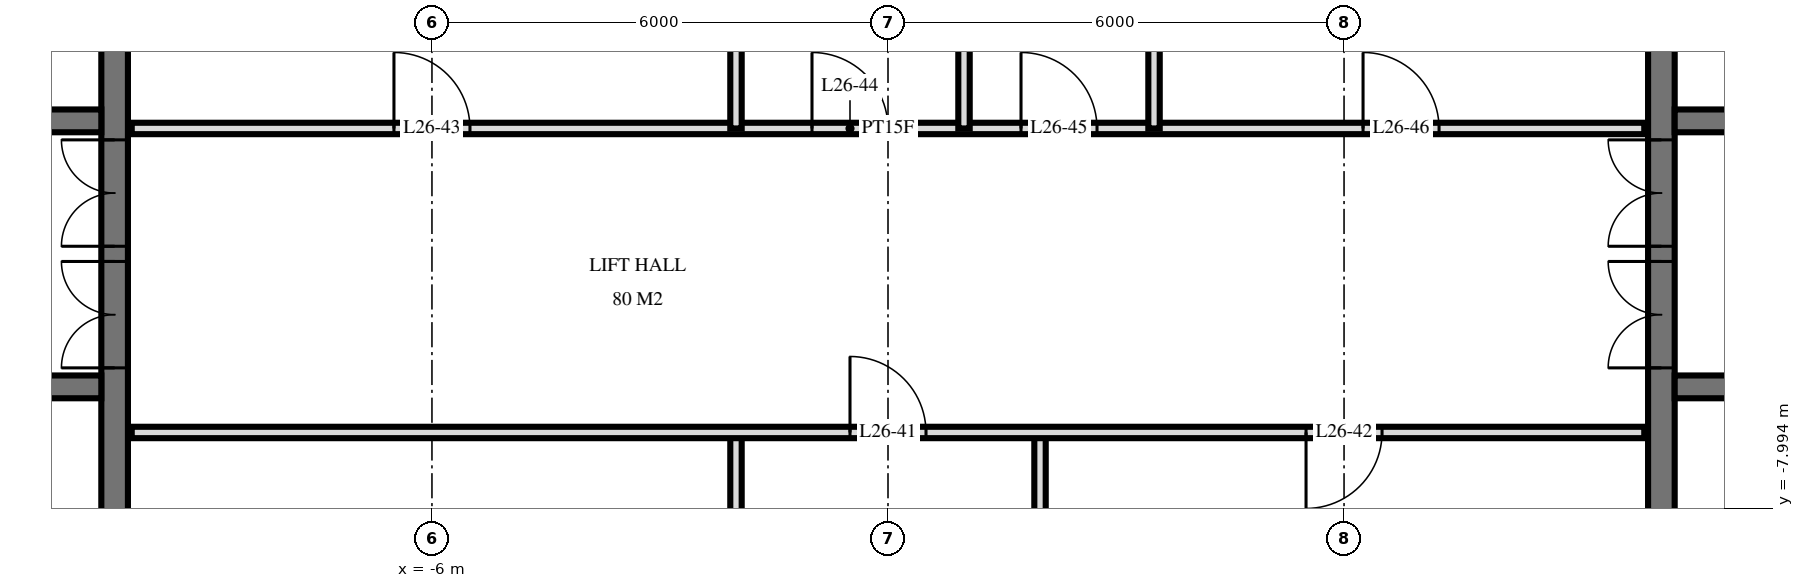
"""IFC4 building model, lengths in metres.
Left out: names, types, materials, properties, quantities, classifications, styles, units other than length and angle.
Written with IfcOpenShell. Run it as: python <this file> out.ifc"""

import sys

from ifc_helpers import new_model, si_unit, direction, frame, frame_2d, origin, place, context, subcontext, project, spatial, rectangle, extrude, element, fill, save


model = new_model("IFC4")
c1 = context("Model", 3, precision=1e-05, world=origin(), true_north=direction((0.0, 1.0)))
c2 = subcontext(c1, "Body", "Model", "MODEL_VIEW")
j1 = project(units=[si_unit("LENGTHUNIT", "METRE"), si_unit("PLANEANGLEUNIT", "RADIAN")], contexts=[c1])
p1 = place(None, origin())
s1 = spatial("IfcSite", under=j1, at=p1, CompositionType="ELEMENT")
p2 = place(p1, origin())
s2 = spatial("IfcBuilding", under=s1, at=p2, CompositionType="ELEMENT")
p3 = place(p2, frame((0.0, 0.0, 103.2)))
s3 = spatial("IfcBuildingStorey", under=s2, at=p3, CompositionType="ELEMENT", Elevation=103.2)
p4 = place(p3, frame((-10.175, -14.55, 0.0), z_axis=(0.0, 0.0, 1.0), x_axis=(0.0, 1.0, 0.0)))
e1 = element("IfcWall", 1, at=p4, inside=s3, PredefinedType="SHEAR", context=c2, shape_type="SweptSolid", body=[
    extrude(rectangle(XDim=14.1, YDim=0.35, at=frame_2d((7.05, 0.0))), origin(), (0.0, 0.0, 1.0), 3.6),
])
p5 = place(p4, frame((8.4, 0.0, 0.0)))
e2 = element("IfcOpeningElement", 2, at=p5, cuts=e1, PredefinedType="OPENING", context=c2, shape_type="SweptSolid", body=[
    extrude(rectangle(XDim=1.4, YDim=2.4, at=frame_2d((0.7, 1.2))), frame((0.0, 0.185, 0.0), z_axis=(0.0, -1.0, 0.0), x_axis=(1.0, 0.0, 0.0)), (0.0, 0.0, 1.0), 0.37),
])
p6 = place(p4, frame((10.0, 0.0, 0.0)))
e3 = element("IfcOpeningElement", 3, at=p6, cuts=e1, PredefinedType="OPENING", context=c2, shape_type="SweptSolid", body=[
    extrude(rectangle(XDim=1.4, YDim=2.4, at=frame_2d((0.7, 1.2))), frame((0.0, 0.185, 0.0), z_axis=(0.0, -1.0, 0.0), x_axis=(1.0, 0.0, 0.0)), (0.0, 0.0, 1.0), 0.37),
])
p7 = place(p4, frame((4.0, 0.0, 0.0)))
e4 = element("IfcOpeningElement", 4, at=p7, cuts=e1, PredefinedType="OPENING", context=c2, shape_type="SweptSolid", body=[
    extrude(rectangle(XDim=1.2, YDim=2.1, at=frame_2d((0.6, 1.05))), frame((0.0, 0.185, 0.0), z_axis=(0.0, -1.0, 0.0), x_axis=(1.0, 0.0, 0.0)), (0.0, 0.0, 1.0), 0.37),
])
p8 = place(p3, frame((-29.05, -2.9, 0.0), z_axis=(0.0, 0.0, 1.0), x_axis=(1.0, 0.0, 0.0)))
e5 = element("IfcWall", 5, at=p8, inside=s3, PredefinedType="SHEAR", context=c2, shape_type="SweptSolid", body=[
    extrude(rectangle(XDim=18.7, YDim=0.3, at=frame_2d((9.35, 0.0))), origin(), (0.0, 0.0, 1.0), 3.6),
])
p9 = place(p8, frame((2.95, 0.0, 0.0)))
e6 = element("IfcOpeningElement", 6, at=p9, cuts=e5, PredefinedType="OPENING", context=c2, shape_type="SweptSolid", body=[
    extrude(rectangle(XDim=1.1, YDim=2.1, at=frame_2d((0.55, 1.05))), frame((0.0, 0.16, 0.0), z_axis=(0.0, -1.0, 0.0), x_axis=(1.0, 0.0, 0.0)), (0.0, 0.0, 1.0), 0.32),
])
p10 = place(p8, frame((0.55, 0.0, 0.0)))
e7 = element("IfcOpeningElement", 7, at=p10, cuts=e5, PredefinedType="OPENING", context=c2, shape_type="SweptSolid", body=[
    extrude(rectangle(XDim=1.1, YDim=2.1, at=frame_2d((0.55, 1.05))), frame((0.0, 0.16, 0.0), z_axis=(0.0, -1.0, 0.0), x_axis=(1.0, 0.0, 0.0)), (0.0, 0.0, 1.0), 0.32),
])
p11 = place(p8, frame((10.9, 0.0, 0.0)))
e8 = element("IfcOpeningElement", 8, at=p11, cuts=e5, PredefinedType="OPENING", context=c2, shape_type="SweptSolid", body=[
    extrude(rectangle(XDim=0.9, YDim=2.1, at=frame_2d((0.45, 1.05))), frame((0.0, 0.16, 0.0), z_axis=(0.0, -1.0, 0.0), x_axis=(1.0, 0.0, 0.0)), (0.0, 0.0, 1.0), 0.32),
])
p12 = place(p8, frame((16.85, 0.0, 0.0)))
e9 = element("IfcOpeningElement", 9, at=p12, cuts=e5, PredefinedType="OPENING", context=c2, shape_type="SweptSolid", body=[
    extrude(rectangle(XDim=1.0, YDim=2.1, at=frame_2d((0.5, 1.05))), frame((0.0, 0.16, 0.0), z_axis=(0.0, -1.0, 0.0), x_axis=(1.0, 0.0, 0.0)), (0.0, 0.0, 1.0), 0.32),
])
p13 = place(p8, frame((13.85, 0.0, 0.0)))
e10 = element("IfcOpeningElement", 10, at=p13, cuts=e5, PredefinedType="OPENING", context=c2, shape_type="SweptSolid", body=[
    extrude(rectangle(XDim=1.0, YDim=2.1, at=frame_2d((0.5, 1.05))), frame((0.0, 0.16, 0.0), z_axis=(0.0, -1.0, 0.0), x_axis=(1.0, 0.0, 0.0)), (0.0, 0.0, 1.0), 0.32),
])
p14 = place(p3, frame((-29.05, -6.4, 0.0), z_axis=(0.0, 0.0, 1.0), x_axis=(1.0, 0.0, 0.0)))
e11 = element("IfcWall", 11, at=p14, inside=s3, PredefinedType="SHEAR", context=c2, shape_type="SweptSolid", body=[
    extrude(rectangle(XDim=18.7, YDim=0.3, at=frame_2d((9.35, 0.0))), origin(), (0.0, 0.0, 1.0), 3.6),
])
p15 = place(p14, frame((2.95, 0.0, 0.0)))
e12 = element("IfcOpeningElement", 12, at=p15, cuts=e11, PredefinedType="OPENING", context=c2, shape_type="SweptSolid", body=[
    extrude(rectangle(XDim=1.1, YDim=2.1, at=frame_2d((0.55, 1.05))), frame((0.0, 0.16, 0.0), z_axis=(0.0, -1.0, 0.0), x_axis=(1.0, 0.0, 0.0)), (0.0, 0.0, 1.0), 0.32),
])
p16 = place(p14, frame((0.55, 0.0, 0.0)))
e13 = element("IfcOpeningElement", 13, at=p16, cuts=e11, PredefinedType="OPENING", context=c2, shape_type="SweptSolid", body=[
    extrude(rectangle(XDim=1.1, YDim=2.1, at=frame_2d((0.55, 1.05))), frame((0.0, 0.16, 0.0), z_axis=(0.0, -1.0, 0.0), x_axis=(1.0, 0.0, 0.0)), (0.0, 0.0, 1.0), 0.32),
])
p17 = place(p14, frame((10.8, 0.0, 0.0)))
e14 = element("IfcOpeningElement", 14, at=p17, cuts=e11, PredefinedType="OPENING", context=c2, shape_type="SweptSolid", body=[
    extrude(rectangle(XDim=1.1, YDim=2.1, at=frame_2d((0.55, 1.05))), frame((0.0, 0.16, 0.0), z_axis=(0.0, -1.0, 0.0), x_axis=(1.0, 0.0, 0.0)), (0.0, 0.0, 1.0), 0.32),
])
p18 = place(p3, frame((10.175, -14.55, 0.0), z_axis=(0.0, 0.0, 1.0), x_axis=(0.0, 1.0, 0.0)))
e15 = element("IfcWall", 15, at=p18, inside=s3, PredefinedType="SHEAR", context=c2, shape_type="SweptSolid", body=[
    extrude(rectangle(XDim=14.1, YDim=0.35, at=frame_2d((7.05, 0.0))), origin(), (0.0, 0.0, 1.0), 3.6),
])
p19 = place(p18, frame((8.4, 0.0, 0.0)))
e16 = element("IfcOpeningElement", 16, at=p19, cuts=e15, PredefinedType="OPENING", context=c2, shape_type="SweptSolid", body=[
    extrude(rectangle(XDim=1.4, YDim=2.4, at=frame_2d((0.7, 1.2))), frame((0.0, 0.185, 0.0), z_axis=(0.0, -1.0, 0.0), x_axis=(1.0, 0.0, 0.0)), (0.0, 0.0, 1.0), 0.37),
])
p20 = place(p18, frame((10.0, 0.0, 0.0)))
e17 = element("IfcOpeningElement", 17, at=p20, cuts=e15, PredefinedType="OPENING", context=c2, shape_type="SweptSolid", body=[
    extrude(rectangle(XDim=1.4, YDim=2.4, at=frame_2d((0.7, 1.2))), frame((0.0, 0.185, 0.0), z_axis=(0.0, -1.0, 0.0), x_axis=(1.0, 0.0, 0.0)), (0.0, 0.0, 1.0), 0.37),
])
p21 = place(p18, frame((4.0, 0.0, 0.0)))
e18 = element("IfcOpeningElement", 18, at=p21, cuts=e15, PredefinedType="OPENING", context=c2, shape_type="SweptSolid", body=[
    extrude(rectangle(XDim=1.2, YDim=2.1, at=frame_2d((0.6, 1.05))), frame((0.0, 0.185, 0.0), z_axis=(0.0, -1.0, 0.0), x_axis=(1.0, 0.0, 0.0)), (0.0, 0.0, 1.0), 0.37),
])
p22 = place(p3, frame((10.35, -2.9, 0.0), z_axis=(0.0, 0.0, 1.0), x_axis=(1.0, 0.0, 0.0)))
e19 = element("IfcWall", 19, at=p22, inside=s3, PredefinedType="SHEAR", context=c2, shape_type="SweptSolid", body=[
    extrude(rectangle(XDim=18.7, YDim=0.3, at=frame_2d((9.35, 0.0))), origin(), (0.0, 0.0, 1.0), 3.6),
])
p23 = place(p22, frame((14.65, 0.0, 0.0)))
e20 = element("IfcOpeningElement", 20, at=p23, cuts=e19, PredefinedType="OPENING", context=c2, shape_type="SweptSolid", body=[
    extrude(rectangle(XDim=1.1, YDim=2.1, at=frame_2d((0.55, 1.05))), frame((0.0, 0.16, 0.0), z_axis=(0.0, -1.0, 0.0), x_axis=(1.0, 0.0, 0.0)), (0.0, 0.0, 1.0), 0.32),
])
p24 = place(p22, frame((17.05, 0.0, 0.0)))
e21 = element("IfcOpeningElement", 21, at=p24, cuts=e19, PredefinedType="OPENING", context=c2, shape_type="SweptSolid", body=[
    extrude(rectangle(XDim=1.1, YDim=2.1, at=frame_2d((0.55, 1.05))), frame((0.0, 0.16, 0.0), z_axis=(0.0, -1.0, 0.0), x_axis=(1.0, 0.0, 0.0)), (0.0, 0.0, 1.0), 0.32),
])
p25 = place(p22, frame((6.9, 0.0, 0.0)))
e22 = element("IfcOpeningElement", 22, at=p25, cuts=e19, PredefinedType="OPENING", context=c2, shape_type="SweptSolid", body=[
    extrude(rectangle(XDim=0.9, YDim=2.1, at=frame_2d((0.45, 1.05))), frame((0.0, 0.16, 0.0), z_axis=(0.0, -1.0, 0.0), x_axis=(1.0, 0.0, 0.0)), (0.0, 0.0, 1.0), 0.32),
])
p26 = place(p22, frame((0.85, 0.0, 0.0)))
e23 = element("IfcOpeningElement", 23, at=p26, cuts=e19, PredefinedType="OPENING", context=c2, shape_type="SweptSolid", body=[
    extrude(rectangle(XDim=1.0, YDim=2.1, at=frame_2d((0.5, 1.05))), frame((0.0, 0.16, 0.0), z_axis=(0.0, -1.0, 0.0), x_axis=(1.0, 0.0, 0.0)), (0.0, 0.0, 1.0), 0.32),
])
p27 = place(p22, frame((3.85, 0.0, 0.0)))
e24 = element("IfcOpeningElement", 24, at=p27, cuts=e19, PredefinedType="OPENING", context=c2, shape_type="SweptSolid", body=[
    extrude(rectangle(XDim=1.0, YDim=2.1, at=frame_2d((0.5, 1.05))), frame((0.0, 0.16, 0.0), z_axis=(0.0, -1.0, 0.0), x_axis=(1.0, 0.0, 0.0)), (0.0, 0.0, 1.0), 0.32),
])
p28 = place(p3, frame((10.35, -6.4, 0.0), z_axis=(0.0, 0.0, 1.0), x_axis=(1.0, 0.0, 0.0)))
e25 = element("IfcWall", 25, at=p28, inside=s3, PredefinedType="SHEAR", context=c2, shape_type="SweptSolid", body=[
    extrude(rectangle(XDim=18.7, YDim=0.3, at=frame_2d((9.35, 0.0))), origin(), (0.0, 0.0, 1.0), 3.6),
])
p29 = place(p28, frame((14.65, 0.0, 0.0)))
e26 = element("IfcOpeningElement", 26, at=p29, cuts=e25, PredefinedType="OPENING", context=c2, shape_type="SweptSolid", body=[
    extrude(rectangle(XDim=1.1, YDim=2.1, at=frame_2d((0.55, 1.05))), frame((0.0, 0.16, 0.0), z_axis=(0.0, -1.0, 0.0), x_axis=(1.0, 0.0, 0.0)), (0.0, 0.0, 1.0), 0.32),
])
p30 = place(p28, frame((17.05, 0.0, 0.0)))
e27 = element("IfcOpeningElement", 27, at=p30, cuts=e25, PredefinedType="OPENING", context=c2, shape_type="SweptSolid", body=[
    extrude(rectangle(XDim=1.1, YDim=2.1, at=frame_2d((0.55, 1.05))), frame((0.0, 0.16, 0.0), z_axis=(0.0, -1.0, 0.0), x_axis=(1.0, 0.0, 0.0)), (0.0, 0.0, 1.0), 0.32),
])
p31 = place(p28, frame((6.8, 0.0, 0.0)))
e28 = element("IfcOpeningElement", 28, at=p31, cuts=e25, PredefinedType="OPENING", context=c2, shape_type="SweptSolid", body=[
    extrude(rectangle(XDim=1.1, YDim=2.1, at=frame_2d((0.55, 1.05))), frame((0.0, 0.16, 0.0), z_axis=(0.0, -1.0, 0.0), x_axis=(1.0, 0.0, 0.0)), (0.0, 0.0, 1.0), 0.32),
])
p32 = place(p3, frame((3.5, -3.0, 0.0), z_axis=(0.0, 0.0, 1.0), x_axis=(0.0, 1.0, 0.0)))
e29 = element("IfcWall", 29, at=p32, inside=s3, PredefinedType="PLUMBINGWALL", context=c2, shape_type="SweptSolid", body=[
    extrude(rectangle(XDim=4.02, YDim=0.15, at=frame_2d((2.01, 0.0))), origin(), (0.0, 0.0, 1.0), 3.32),
])
p33 = place(p3, frame((2.0, -11.0, 0.0), z_axis=(0.0, 0.0, 1.0), x_axis=(0.0, 1.0, 0.0)))
e30 = element("IfcWall", 30, at=p33, inside=s3, PredefinedType="PARTITIONING", context=c2, shape_type="SweptSolid", body=[
    extrude(rectangle(XDim=4.0, YDim=0.15, at=frame_2d((2.0, 0.0))), origin(), (0.0, 0.0, 1.0), 3.32),
])
p34 = place(p3, frame((1.0, -3.0, 0.0), z_axis=(0.0, 0.0, 1.0), x_axis=(0.0, 1.0, 0.0)))
e31 = element("IfcWall", 31, at=p34, inside=s3, PredefinedType="PLUMBINGWALL", context=c2, shape_type="SweptSolid", body=[
    extrude(rectangle(XDim=4.02, YDim=0.15, at=frame_2d((2.01, 0.0))), origin(), (0.0, 0.0, 1.0), 3.32),
])
p35 = place(p3, frame((-2.0, -11.0, 0.0), z_axis=(0.0, 0.0, 1.0), x_axis=(0.0, 1.0, 0.0)))
e32 = element("IfcWall", 32, at=p35, inside=s3, PredefinedType="PARTITIONING", context=c2, shape_type="SweptSolid", body=[
    extrude(rectangle(XDim=4.0, YDim=0.15, at=frame_2d((2.0, 0.0))), origin(), (0.0, 0.0, 1.0), 3.32),
])
p36 = place(p3, frame((-2.0, -3.0, 0.0), z_axis=(0.0, 0.0, 1.0), x_axis=(0.0, 1.0, 0.0)))
e33 = element("IfcWall", 33, at=p36, inside=s3, PredefinedType="PLUMBINGWALL", context=c2, shape_type="SweptSolid", body=[
    extrude(rectangle(XDim=4.02, YDim=0.15, at=frame_2d((2.01, 0.0))), origin(), (0.0, 0.0, 1.0), 3.32),
])
p37 = place(p3, frame((-9.95, -7.0, 0.0), z_axis=(0.0, 0.0, 1.0), x_axis=(1.0, 0.0, 0.0)))
e34 = element("IfcWall", 34, at=p37, inside=s3, PredefinedType="PARTITIONING", context=c2, shape_type="SweptSolid", body=[
    extrude(rectangle(XDim=19.9, YDim=0.15, at=frame_2d((9.95, 0.0))), origin(), (0.0, 0.0, 1.0), 3.32),
])
p38 = place(p37, frame((9.45, 0.0, 0.0)))
e35 = element("IfcOpeningElement", 35, at=p38, cuts=e34, PredefinedType="OPENING", context=c2, shape_type="SweptSolid", body=[
    extrude(rectangle(XDim=1.0, YDim=2.1, at=frame_2d((0.5, 1.05))), frame((0.0, 0.085, 0.0), z_axis=(0.0, -1.0, 0.0), x_axis=(1.0, 0.0, 0.0)), (0.0, 0.0, 1.0), 0.17),
])
p39 = place(p37, frame((15.45, 0.0, 0.0)))
e36 = element("IfcOpeningElement", 36, at=p39, cuts=e34, PredefinedType="OPENING", context=c2, shape_type="SweptSolid", body=[
    extrude(rectangle(XDim=1.0, YDim=2.1, at=frame_2d((0.5, 1.05))), frame((0.0, 0.085, 0.0), z_axis=(0.0, -1.0, 0.0), x_axis=(1.0, 0.0, 0.0)), (0.0, 0.0, 1.0), 0.17),
])
p40 = place(p3, frame((-9.95, -3.0, 0.0), z_axis=(0.0, 0.0, 1.0), x_axis=(1.0, 0.0, 0.0)))
e37 = element("IfcWall", 37, at=p40, inside=s3, PredefinedType="PARTITIONING", context=c2, shape_type="SweptSolid", body=[
    extrude(rectangle(XDim=19.9, YDim=0.15, at=frame_2d((9.95, 0.0))), origin(), (0.0, 0.0, 1.0), 3.32),
])
p41 = place(p40, frame((3.45, 0.0, 0.0)))
e38 = element("IfcOpeningElement", 38, at=p41, cuts=e37, PredefinedType="OPENING", context=c2, shape_type="SweptSolid", body=[
    extrude(rectangle(XDim=1.0, YDim=2.1, at=frame_2d((0.5, 1.05))), frame((0.0, 0.085, 0.0), z_axis=(0.0, -1.0, 0.0), x_axis=(1.0, 0.0, 0.0)), (0.0, 0.0, 1.0), 0.17),
])
p42 = place(p40, frame((8.95, 0.0, 0.0)))
e39 = element("IfcOpeningElement", 39, at=p42, cuts=e37, PredefinedType="OPENING", context=c2, shape_type="SweptSolid", body=[
    extrude(rectangle(XDim=1.0, YDim=2.1, at=frame_2d((0.5, 1.05))), frame((0.0, 0.085, 0.0), z_axis=(0.0, -1.0, 0.0), x_axis=(1.0, 0.0, 0.0)), (0.0, 0.0, 1.0), 0.17),
])
p43 = place(p40, frame((11.7, 0.0, 0.0)))
e40 = element("IfcOpeningElement", 40, at=p43, cuts=e37, PredefinedType="OPENING", context=c2, shape_type="SweptSolid", body=[
    extrude(rectangle(XDim=1.0, YDim=2.1, at=frame_2d((0.5, 1.05))), frame((0.0, 0.085, 0.0), z_axis=(0.0, -1.0, 0.0), x_axis=(1.0, 0.0, 0.0)), (0.0, 0.0, 1.0), 0.17),
])
p44 = place(p40, frame((16.2, 0.0, 0.0)))
e41 = element("IfcOpeningElement", 41, at=p44, cuts=e37, PredefinedType="OPENING", context=c2, shape_type="SweptSolid", body=[
    extrude(rectangle(XDim=1.0, YDim=2.1, at=frame_2d((0.5, 1.05))), frame((0.0, 0.085, 0.0), z_axis=(0.0, -1.0, 0.0), x_axis=(1.0, 0.0, 0.0)), (0.0, 0.0, 1.0), 0.17),
])
p45 = place(p5, origin())
e42 = element("IfcDoor", 42, at=p45, inside=s3, OperationType="DOUBLE_DOOR_SINGLE_SWING", PredefinedType="DOOR", context=c2, shape_type="SweptSolid", body=[
    extrude(rectangle(XDim=1.4, YDim=2.4, at=frame_2d((0.7, 1.2))), frame((0.0, 0.025, 0.0), z_axis=(0.0, -1.0, 0.0), x_axis=(1.0, 0.0, 0.0)), (0.0, 0.0, 1.0), 0.05),
])
fill(e2, e42)
p46 = place(p6, origin())
e43 = element("IfcDoor", 43, at=p46, inside=s3, OperationType="DOUBLE_DOOR_SINGLE_SWING", PredefinedType="DOOR", context=c2, shape_type="SweptSolid", body=[
    extrude(rectangle(XDim=1.4, YDim=2.4, at=frame_2d((0.7, 1.2))), frame((0.0, 0.025, 0.0), z_axis=(0.0, -1.0, 0.0), x_axis=(1.0, 0.0, 0.0)), (0.0, 0.0, 1.0), 0.05),
])
fill(e3, e43)
p47 = place(p19, origin())
e44 = element("IfcDoor", 44, at=p47, inside=s3, OperationType="DOUBLE_DOOR_SINGLE_SWING", PredefinedType="DOOR", context=c2, shape_type="SweptSolid", body=[
    extrude(rectangle(XDim=1.4, YDim=2.4, at=frame_2d((0.7, 1.2))), frame((0.0, 0.025, 0.0), z_axis=(0.0, -1.0, 0.0), x_axis=(1.0, 0.0, 0.0)), (0.0, 0.0, 1.0), 0.05),
])
fill(e16, e44)
p48 = place(p20, origin())
e45 = element("IfcDoor", 45, at=p48, inside=s3, OperationType="DOUBLE_DOOR_SINGLE_SWING", PredefinedType="DOOR", context=c2, shape_type="SweptSolid", body=[
    extrude(rectangle(XDim=1.4, YDim=2.4, at=frame_2d((0.7, 1.2))), frame((0.0, 0.025, 0.0), z_axis=(0.0, -1.0, 0.0), x_axis=(1.0, 0.0, 0.0)), (0.0, 0.0, 1.0), 0.05),
])
fill(e17, e45)
p49 = place(p38, origin())
e46 = element("IfcDoor", 46, at=p49, inside=s3, OperationType="SINGLE_SWING_RIGHT", PredefinedType="DOOR", context=c2, shape_type="SweptSolid", body=[
    extrude(rectangle(XDim=1.0, YDim=2.1, at=frame_2d((0.5, 1.05))), frame((0.0, 0.025, 0.0), z_axis=(0.0, -1.0, 0.0), x_axis=(1.0, 0.0, 0.0)), (0.0, 0.0, 1.0), 0.05),
])
fill(e35, e46)
p50 = place(p39, frame((0.5, 0.0, 0.0), z_axis=(0.0, 0.0, 1.0), x_axis=(-1.0, 0.0, 0.0)))
e47 = element("IfcDoor", 47, at=p50, inside=s3, OperationType="SINGLE_SWING_LEFT", PredefinedType="DOOR", context=c2, shape_type="SweptSolid", body=[
    extrude(rectangle(XDim=1.0, YDim=2.1, at=frame_2d((0.0, 1.05))), frame((0.0, -0.025, 0.0), z_axis=(0.0, 1.0, 0.0), x_axis=(-1.0, 0.0, 0.0)), (0.0, 0.0, 1.0), 0.05),
])
fill(e36, e47)
p51 = place(p41, origin())
e48 = element("IfcDoor", 48, at=p51, inside=s3, OperationType="SINGLE_SWING_RIGHT", PredefinedType="DOOR", context=c2, shape_type="SweptSolid", body=[
    extrude(rectangle(XDim=1.0, YDim=2.1, at=frame_2d((0.5, 1.05))), frame((0.0, 0.025, 0.0), z_axis=(0.0, -1.0, 0.0), x_axis=(1.0, 0.0, 0.0)), (0.0, 0.0, 1.0), 0.05),
])
fill(e38, e48)
p52 = place(p42, origin())
e49 = element("IfcDoor", 49, at=p52, inside=s3, OperationType="SINGLE_SWING_RIGHT", PredefinedType="DOOR", context=c2, shape_type="SweptSolid", body=[
    extrude(rectangle(XDim=1.0, YDim=2.1, at=frame_2d((0.5, 1.05))), frame((0.0, 0.025, 0.0), z_axis=(0.0, -1.0, 0.0), x_axis=(1.0, 0.0, 0.0)), (0.0, 0.0, 1.0), 0.05),
])
fill(e39, e49)
p53 = place(p43, origin())
e50 = element("IfcDoor", 50, at=p53, inside=s3, OperationType="SINGLE_SWING_RIGHT", PredefinedType="DOOR", context=c2, shape_type="SweptSolid", body=[
    extrude(rectangle(XDim=1.0, YDim=2.1, at=frame_2d((0.5, 1.05))), frame((0.0, 0.025, 0.0), z_axis=(0.0, -1.0, 0.0), x_axis=(1.0, 0.0, 0.0)), (0.0, 0.0, 1.0), 0.05),
])
fill(e40, e50)
p54 = place(p44, origin())
e51 = element("IfcDoor", 51, at=p54, inside=s3, OperationType="SINGLE_SWING_RIGHT", PredefinedType="DOOR", context=c2, shape_type="SweptSolid", body=[
    extrude(rectangle(XDim=1.0, YDim=2.1, at=frame_2d((0.5, 1.05))), frame((0.0, 0.025, 0.0), z_axis=(0.0, -1.0, 0.0), x_axis=(1.0, 0.0, 0.0)), (0.0, 0.0, 1.0), 0.05),
])
fill(e41, e51)
save(model, sys.argv[1])
